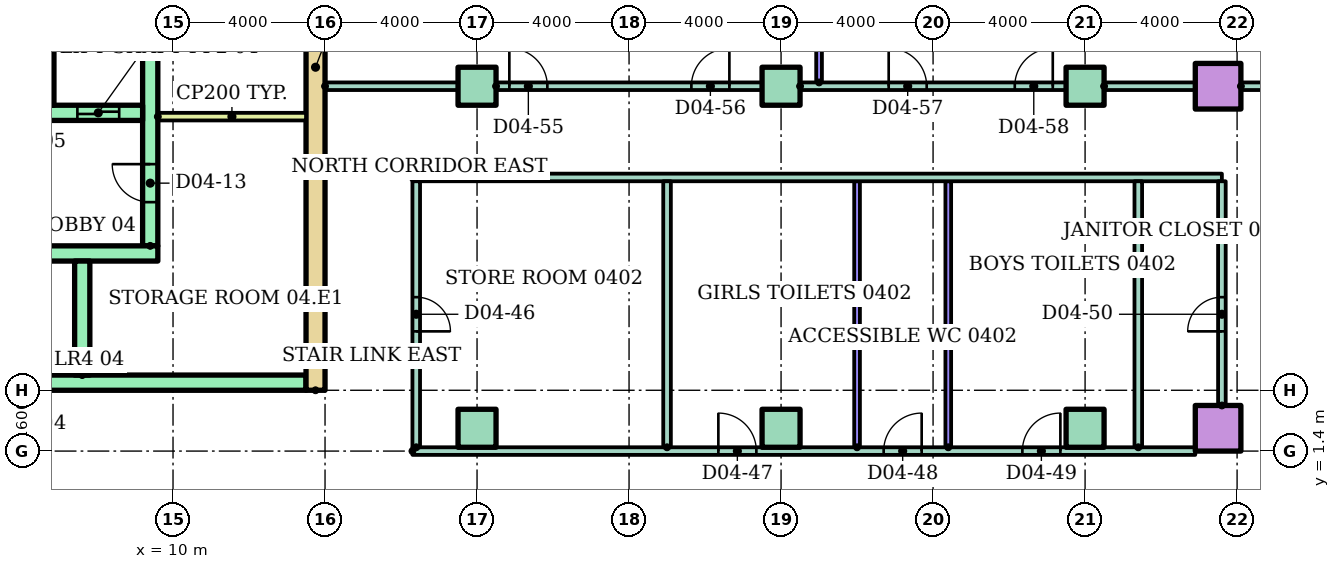
"""IFC4 building model, lengths in metres.
Left out: names, types, materials, properties, quantities, classifications, styles, units other than length and angle.
Written with IfcOpenShell. Run it as: python <this file> out.ifc"""

import sys

from ifc_helpers import new_model, si_unit, direction, frame, frame_2d, origin, origin_2d, place, context, subcontext, project, spatial, rectangle, hollow_rectangle, extrude, element, fill, save


model = new_model("IFC4")
c1 = context("Model", 3, precision=1e-05, world=origin(), true_north=direction((0.0, 1.0)))
c2 = subcontext(c1, "Body", "Model", "MODEL_VIEW")
j1 = project(units=[si_unit("LENGTHUNIT", "METRE"), si_unit("PLANEANGLEUNIT", "RADIAN")], contexts=[c1])
p1 = place(None, origin())
s1 = spatial("IfcSite", under=j1, at=p1, CompositionType="ELEMENT")
p2 = place(p1, origin())
s2 = spatial("IfcBuilding", under=s1, at=p2, CompositionType="ELEMENT")
p3 = place(p2, frame((0.0, 0.0, 18.0)))
s3 = spatial("IfcBuildingStorey", under=s2, at=p3, CompositionType="ELEMENT", Elevation=18.0)
for number, where in (
    (1, (18.0, 2.0, 0.0)),
    (2, (26.0, 2.0, 0.0)),
    (3, (34.0, 2.0, 0.0)),
):
    element("IfcColumn", number, at=place(p3, frame(where)), inside=s3, PredefinedType="COLUMN", context=c2, shape_type="SweptSolid", body=[
        extrude(rectangle(XDim=1.0, YDim=1.0, at=origin_2d()), origin(), (0.0, 0.0, 1.0), 4.0),
    ])
p4 = place(p3, frame((37.5, 2.0, 0.0)))
e4 = element("IfcColumn", 4, at=p4, inside=s3, PredefinedType="COLUMN", context=c2, shape_type="SweptSolid", body=[
    extrude(hollow_rectangle(XDim=1.2, YDim=1.2, WallThickness=0.06, at=origin_2d()), origin(), (0.0, 0.0, 1.0), 4.0),
])
for number, where in (
    (5, (18.0, 11.0, 0.0)),
    (6, (26.0, 11.0, 0.0)),
    (7, (34.0, 11.0, 0.0)),
):
    element("IfcColumn", number, at=place(p3, frame(where)), inside=s3, PredefinedType="COLUMN", context=c2, shape_type="SweptSolid", body=[
        extrude(rectangle(XDim=1.0, YDim=1.0, at=origin_2d()), origin(), (0.0, 0.0, 1.0), 4.0),
    ])
p5 = place(p3, frame((37.5, 11.0, 0.0)))
e8 = element("IfcColumn", 8, at=p5, inside=s3, PredefinedType="COLUMN", context=c2, shape_type="SweptSolid", body=[
    extrude(hollow_rectangle(XDim=1.2, YDim=1.2, WallThickness=0.06, at=origin_2d()), origin(), (0.0, 0.0, 1.0), 4.0),
])
p6 = place(p3, frame((13.75, 3.0, 0.0), z_axis=(0.0, 0.0, 1.0), x_axis=(0.0, 1.0, 0.0)))
e9 = element("IfcWall", 9, at=p6, inside=s3, PredefinedType="SHEAR", context=c2, shape_type="SweptSolid", body=[
    extrude(rectangle(XDim=17.0, YDim=0.5, at=frame_2d((8.5, 0.0))), origin(), (0.0, 0.0, 1.0), 3.7),
])
p7 = place(p3, frame((9.4, 6.8, 0.0), z_axis=(0.0, 0.0, 1.0), x_axis=(0.0, 1.0, 0.0)))
e10 = element("IfcWall", 10, at=p7, inside=s3, PredefinedType="SHEAR", context=c2, shape_type="SweptSolid", body=[
    extrude(rectangle(XDim=12.7, YDim=0.4, at=frame_2d((6.35, 0.0))), origin(), (0.0, 0.0, 1.0), 3.7),
])
p8 = place(p7, frame((1.15, 0.0, 0.0)))
e11 = element("IfcOpeningElement", 11, at=p8, cuts=e10, PredefinedType="OPENING", context=c2, shape_type="SweptSolid", body=[
    extrude(rectangle(XDim=1.0, YDim=2.1, at=frame_2d((0.5, 1.05))), frame((0.0, 0.21, 0.0), z_axis=(0.0, -1.0, 0.0), x_axis=(1.0, 0.0, 0.0)), (0.0, 0.0, 1.0), 0.42),
])
p9 = place(p7, frame((7.925, 0.0, 0.0)))
e12 = element("IfcOpeningElement", 12, at=p9, cuts=e10, PredefinedType="OPENING", context=c2, shape_type="SweptSolid", body=[
    extrude(rectangle(XDim=1.0, YDim=2.1, at=frame_2d((0.5, 1.05))), frame((0.0, 0.21, 0.0), z_axis=(0.0, -1.0, 0.0), x_axis=(1.0, 0.0, 0.0)), (0.0, 0.0, 1.0), 0.42),
])
p10 = place(p3, frame((-13.5, 3.2, 0.0)))
e13 = element("IfcWall", 13, at=p10, inside=s3, PredefinedType="SHEAR", context=c2, shape_type="SweptSolid", body=[
    extrude(rectangle(XDim=27.0, YDim=0.4, at=frame_2d((13.5, 0.0))), origin(), (0.0, 0.0, 1.0), 3.7),
])
p11 = place(p10, frame((6.861, 0.0, 0.0)))
e14 = element("IfcOpeningElement", 14, at=p11, cuts=e13, PredefinedType="OPENING", context=c2, shape_type="SweptSolid", body=[
    extrude(rectangle(XDim=1.1, YDim=2.1, at=frame_2d((0.55, 1.05))), frame((0.0, 0.21, 0.0), z_axis=(0.0, -1.0, 0.0), x_axis=(1.0, 0.0, 0.0)), (0.0, 0.0, 1.0), 0.42),
])
p12 = place(p10, frame((9.906, 0.0, 0.0)))
e15 = element("IfcOpeningElement", 15, at=p12, cuts=e13, PredefinedType="OPENING", context=c2, shape_type="SweptSolid", body=[
    extrude(rectangle(XDim=1.1, YDim=2.1, at=frame_2d((0.55, 1.05))), frame((0.0, 0.21, 0.0), z_axis=(0.0, -1.0, 0.0), x_axis=(1.0, 0.0, 0.0)), (0.0, 0.0, 1.0), 0.42),
])
p13 = place(p10, frame((15.994, 0.0, 0.0)))
e16 = element("IfcOpeningElement", 16, at=p13, cuts=e13, PredefinedType="OPENING", context=c2, shape_type="SweptSolid", body=[
    extrude(rectangle(XDim=1.1, YDim=2.1, at=frame_2d((0.55, 1.05))), frame((0.0, 0.21, 0.0), z_axis=(0.0, -1.0, 0.0), x_axis=(1.0, 0.0, 0.0)), (0.0, 0.0, 1.0), 0.42),
])
p14 = place(p10, frame((19.039, 0.0, 0.0)))
e17 = element("IfcOpeningElement", 17, at=p14, cuts=e13, PredefinedType="OPENING", context=c2, shape_type="SweptSolid", body=[
    extrude(rectangle(XDim=1.1, YDim=2.1, at=frame_2d((0.55, 1.05))), frame((0.0, 0.21, 0.0), z_axis=(0.0, -1.0, 0.0), x_axis=(1.0, 0.0, 0.0)), (0.0, 0.0, 1.0), 0.42),
])
p15 = place(p10, frame((12.6, 0.0, 0.0)))
e18 = element("IfcOpeningElement", 18, at=p15, cuts=e13, PredefinedType="OPENING", context=c2, shape_type="SweptSolid", body=[
    extrude(rectangle(XDim=1.8, YDim=2.1, at=frame_2d((0.9, 1.05))), frame((0.0, 0.21, 0.0), z_axis=(0.0, -1.0, 0.0), x_axis=(1.0, 0.0, 0.0)), (0.0, 0.0, 1.0), 0.42),
])
p16 = place(p3, frame((1.522, 6.6, 0.0)))
e19 = element("IfcWall", 19, at=p16, inside=s3, PredefinedType="SHEAR", context=c2, shape_type="SweptSolid", body=[
    extrude(rectangle(XDim=8.078, YDim=0.4, at=frame_2d((4.039, 0.0))), origin(), (0.0, 0.0, 1.0), 3.7),
])
p17 = place(p3, frame((7.611, 3.4, 0.0), z_axis=(0.0, 0.0, 1.0), x_axis=(0.0, 1.0, 0.0)))
e20 = element("IfcWall", 20, at=p17, inside=s3, PredefinedType="SHEAR", context=c2, shape_type="SweptSolid", body=[
    extrude(rectangle(XDim=3.0, YDim=0.4, at=frame_2d((1.5, 0.0))), origin(), (0.0, 0.0, 1.0), 3.7),
])
p18 = place(p3, frame((1.2, 10.3, 0.0)))
e21 = element("IfcWall", 21, at=p18, inside=s3, PredefinedType="SHEAR", context=c2, shape_type="SweptSolid", body=[
    extrude(rectangle(XDim=8.0, YDim=0.4, at=frame_2d((4.0, 0.0))), origin(), (0.0, 0.0, 1.0), 3.7),
])
p19 = place(p18, frame((3.55, 0.0, 0.0)))
e22 = element("IfcOpeningElement", 22, at=p19, cuts=e21, PredefinedType="OPENING", context=c2, shape_type="SweptSolid", body=[
    extrude(rectangle(XDim=1.1, YDim=2.1, at=frame_2d((0.55, 1.05))), frame((0.0, 0.21, 0.0), z_axis=(0.0, -1.0, 0.0), x_axis=(1.0, 0.0, 0.0)), (0.0, 0.0, 1.0), 0.42),
])
p20 = place(p18, frame((6.283, 0.0, 0.0)))
e23 = element("IfcOpeningElement", 23, at=p20, cuts=e21, PredefinedType="OPENING", context=c2, shape_type="SweptSolid", body=[
    extrude(rectangle(XDim=1.1, YDim=2.1, at=frame_2d((0.55, 1.05))), frame((0.0, 0.21, 0.0), z_axis=(0.0, -1.0, 0.0), x_axis=(1.0, 0.0, 0.0)), (0.0, 0.0, 1.0), 0.42),
])
p21 = place(p18, frame((0.867, 0.0, 0.0)))
e24 = element("IfcOpeningElement", 24, at=p21, cuts=e21, PredefinedType="OPENING", context=c2, shape_type="SweptSolid", body=[
    extrude(rectangle(XDim=1.0, YDim=2.1, at=frame_2d((0.5, 1.05))), frame((0.0, 0.21, 0.0), z_axis=(0.0, -1.0, 0.0), x_axis=(1.0, 0.0, 0.0)), (0.0, 0.0, 1.0), 0.42),
])
p22 = place(p3, frame((6.667, 10.5, 0.0), z_axis=(0.0, 0.0, 1.0), x_axis=(0.0, 1.0, 0.0)))
e25 = element("IfcWall", 25, at=p22, inside=s3, PredefinedType="SHEAR", context=c2, shape_type="SweptSolid", body=[
    extrude(rectangle(XDim=3.0, YDim=0.4, at=frame_2d((1.5, 0.0))), origin(), (0.0, 0.0, 1.0), 3.7),
])
p23 = place(p3, frame((9.6, 10.2, 0.0)))
e26 = element("IfcWall", 26, at=p23, inside=s3, PredefinedType="PARTITIONING", context=c2, shape_type="SweptSolid", body=[
    extrude(rectangle(XDim=3.9, YDim=0.2, at=frame_2d((1.95, 0.0))), origin(), (0.0, 0.0, 1.0), 3.7),
])
p24 = place(p3, frame((16.3, 1.4, 0.0)))
e27 = element("IfcWall", 27, at=p24, inside=s3, PredefinedType="PARTITIONING", context=c2, shape_type="SweptSolid", body=[
    extrude(rectangle(XDim=20.6, YDim=0.2, at=frame_2d((10.3, 0.0))), origin(), (0.0, 0.0, 1.0), 3.7),
])
p25 = place(p24, frame((8.05, 0.0, 0.0)))
e28 = element("IfcOpeningElement", 28, at=p25, cuts=e27, PredefinedType="OPENING", context=c2, shape_type="SweptSolid", body=[
    extrude(rectangle(XDim=1.0, YDim=2.1, at=frame_2d((0.5, 1.05))), frame((0.0, 0.11, 0.0), z_axis=(0.0, -1.0, 0.0), x_axis=(1.0, 0.0, 0.0)), (0.0, 0.0, 1.0), 0.22),
])
p26 = place(p24, frame((12.4, 0.0, 0.0)))
e29 = element("IfcOpeningElement", 29, at=p26, cuts=e27, PredefinedType="OPENING", context=c2, shape_type="SweptSolid", body=[
    extrude(rectangle(XDim=1.0, YDim=2.1, at=frame_2d((0.5, 1.05))), frame((0.0, 0.11, 0.0), z_axis=(0.0, -1.0, 0.0), x_axis=(1.0, 0.0, 0.0)), (0.0, 0.0, 1.0), 0.22),
])
p27 = place(p24, frame((16.05, 0.0, 0.0)))
e30 = element("IfcOpeningElement", 30, at=p27, cuts=e27, PredefinedType="OPENING", context=c2, shape_type="SweptSolid", body=[
    extrude(rectangle(XDim=1.0, YDim=2.1, at=frame_2d((0.5, 1.05))), frame((0.0, 0.11, 0.0), z_axis=(0.0, -1.0, 0.0), x_axis=(1.0, 0.0, 0.0)), (0.0, 0.0, 1.0), 0.22),
])
p28 = place(p3, frame((16.3, 8.6, 0.0)))
e31 = element("IfcWall", 31, at=p28, inside=s3, PredefinedType="PARTITIONING", context=c2, shape_type="SweptSolid", body=[
    extrude(rectangle(XDim=21.3, YDim=0.2, at=frame_2d((10.65, 0.0))), origin(), (0.0, 0.0, 1.0), 3.7),
])
p29 = place(p3, frame((14.0, 11.0, 0.0)))
e32 = element("IfcWall", 32, at=p29, inside=s3, PredefinedType="PARTITIONING", context=c2, shape_type="SweptSolid", body=[
    extrude(rectangle(XDim=3.5, YDim=0.2, at=frame_2d((1.75, 0.0))), origin(), (0.0, 0.0, 1.0), 3.7),
])
p30 = place(p3, frame((18.5, 11.0, 0.0)))
e33 = element("IfcWall", 33, at=p30, inside=s3, PredefinedType="PARTITIONING", context=c2, shape_type="SweptSolid", body=[
    extrude(rectangle(XDim=7.0, YDim=0.2, at=frame_2d((3.5, 0.0))), origin(), (0.0, 0.0, 1.0), 3.7),
])
p31 = place(p30, frame((0.35, 0.0, 0.0)))
e34 = element("IfcOpeningElement", 34, at=p31, cuts=e33, PredefinedType="OPENING", context=c2, shape_type="SweptSolid", body=[
    extrude(rectangle(XDim=1.0, YDim=2.1, at=frame_2d((0.5, 1.05))), frame((0.0, 0.11, 0.0), z_axis=(0.0, -1.0, 0.0), x_axis=(1.0, 0.0, 0.0)), (0.0, 0.0, 1.0), 0.22),
])
p32 = place(p30, frame((5.14, 0.0, 0.0)))
e35 = element("IfcOpeningElement", 35, at=p32, cuts=e33, PredefinedType="OPENING", context=c2, shape_type="SweptSolid", body=[
    extrude(rectangle(XDim=1.0, YDim=2.1, at=frame_2d((0.5, 1.05))), frame((0.0, 0.11, 0.0), z_axis=(0.0, -1.0, 0.0), x_axis=(1.0, 0.0, 0.0)), (0.0, 0.0, 1.0), 0.22),
])
p33 = place(p3, frame((26.5, 11.0, 0.0)))
e36 = element("IfcWall", 36, at=p33, inside=s3, PredefinedType="PARTITIONING", context=c2, shape_type="SweptSolid", body=[
    extrude(rectangle(XDim=7.0, YDim=0.2, at=frame_2d((3.5, 0.0))), origin(), (0.0, 0.0, 1.0), 3.7),
])
p34 = place(p33, frame((2.332, 0.0, 0.0)))
e37 = element("IfcOpeningElement", 37, at=p34, cuts=e36, PredefinedType="OPENING", context=c2, shape_type="SweptSolid", body=[
    extrude(rectangle(XDim=1.0, YDim=2.1, at=frame_2d((0.5, 1.05))), frame((0.0, 0.11, 0.0), z_axis=(0.0, -1.0, 0.0), x_axis=(1.0, 0.0, 0.0)), (0.0, 0.0, 1.0), 0.22),
])
p35 = place(p33, frame((5.65, 0.0, 0.0)))
e38 = element("IfcOpeningElement", 38, at=p35, cuts=e36, PredefinedType="OPENING", context=c2, shape_type="SweptSolid", body=[
    extrude(rectangle(XDim=1.0, YDim=2.1, at=frame_2d((0.5, 1.05))), frame((0.0, 0.11, 0.0), z_axis=(0.0, -1.0, 0.0), x_axis=(1.0, 0.0, 0.0)), (0.0, 0.0, 1.0), 0.22),
])
p36 = place(p3, frame((34.5, 11.0, 0.0)))
e39 = element("IfcWall", 39, at=p36, inside=s3, PredefinedType="PARTITIONING", context=c2, shape_type="SweptSolid", body=[
    extrude(rectangle(XDim=2.4, YDim=0.2, at=frame_2d((1.2, 0.0))), origin(), (0.0, 0.0, 1.0), 3.7),
])
p37 = place(p3, frame((38.1, 11.0, 0.0)))
e40 = element("IfcWall", 40, at=p37, inside=s3, PredefinedType="PARTITIONING", context=c2, shape_type="SweptSolid", body=[
    extrude(rectangle(XDim=1.5, YDim=0.2, at=frame_2d((0.75, 0.0))), origin(), (0.0, 0.0, 1.0), 3.7),
])
p38 = place(p3, frame((16.4, 1.5, 0.0), z_axis=(0.0, 0.0, 1.0), x_axis=(0.0, 1.0, 0.0)))
e41 = element("IfcWall", 41, at=p38, inside=s3, PredefinedType="PARTITIONING", context=c2, shape_type="SweptSolid", body=[
    extrude(rectangle(XDim=7.0, YDim=0.2, at=frame_2d((3.5, 0.0))), origin(), (0.0, 0.0, 1.0), 3.7),
])
p39 = place(p38, frame((3.05, 0.0, 0.0)))
e42 = element("IfcOpeningElement", 42, at=p39, cuts=e41, PredefinedType="OPENING", context=c2, shape_type="SweptSolid", body=[
    extrude(rectangle(XDim=0.9, YDim=2.1, at=frame_2d((0.45, 1.05))), frame((0.0, 0.11, 0.0), z_axis=(0.0, -1.0, 0.0), x_axis=(1.0, 0.0, 0.0)), (0.0, 0.0, 1.0), 0.22),
])
p40 = place(p3, frame((23.0, 1.5, 0.0), z_axis=(0.0, 0.0, 1.0), x_axis=(0.0, 1.0, 0.0)))
e43 = element("IfcWall", 43, at=p40, inside=s3, PredefinedType="PARTITIONING", context=c2, shape_type="SweptSolid", body=[
    extrude(rectangle(XDim=7.0, YDim=0.2, at=frame_2d((3.5, 0.0))), origin(), (0.0, 0.0, 1.0), 3.7),
])
p41 = place(p3, frame((27.0, 11.1, 0.0), z_axis=(0.0, 0.0, 1.0), x_axis=(0.0, 1.0, 0.0)))
e44 = element("IfcWall", 44, at=p41, inside=s3, PredefinedType="PARTITIONING", context=c2, shape_type="SweptSolid", body=[
    extrude(rectangle(XDim=8.5, YDim=0.15, at=frame_2d((4.25, 0.0))), origin(), (0.0, 0.0, 1.0), 3.7),
])
for number, where, z_axis, x_axis in (
    (45, (28.0, 1.5, 0.0), (0.0, 0.0, 1.0), (0.0, 1.0, 0.0)),
    (46, (30.4, 1.5, 0.0), (0.0, 0.0, 1.0), (0.0, 1.0, 0.0)),
):
    element("IfcWall", number, at=place(p3, frame(where, z_axis=z_axis, x_axis=x_axis)), inside=s3, PredefinedType="PARTITIONING", context=c2, shape_type="SweptSolid", body=[
        extrude(rectangle(XDim=7.0, YDim=0.15, at=frame_2d((3.5, 0.0))), origin(), (0.0, 0.0, 1.0), 3.7),
    ])
p42 = place(p3, frame((35.4, 1.5, 0.0), z_axis=(0.0, 0.0, 1.0), x_axis=(0.0, 1.0, 0.0)))
e47 = element("IfcWall", 47, at=p42, inside=s3, PredefinedType="PARTITIONING", context=c2, shape_type="SweptSolid", body=[
    extrude(rectangle(XDim=7.0, YDim=0.2, at=frame_2d((3.5, 0.0))), origin(), (0.0, 0.0, 1.0), 3.7),
])
p43 = place(p3, frame((37.6, 2.6, 0.0), z_axis=(0.0, 0.0, 1.0), x_axis=(0.0, 1.0, 0.0)))
e48 = element("IfcWall", 48, at=p43, inside=s3, PredefinedType="PARTITIONING", context=c2, shape_type="SweptSolid", body=[
    extrude(rectangle(XDim=5.9, YDim=0.2, at=frame_2d((2.95, 0.0))), origin(), (0.0, 0.0, 1.0), 3.7),
])
p44 = place(p43, frame((1.95, 0.0, 0.0)))
e49 = element("IfcOpeningElement", 49, at=p44, cuts=e48, PredefinedType="OPENING", context=c2, shape_type="SweptSolid", body=[
    extrude(rectangle(XDim=0.9, YDim=2.1, at=frame_2d((0.45, 1.05))), frame((0.0, 0.11, 0.0), z_axis=(0.0, -1.0, 0.0), x_axis=(1.0, 0.0, 0.0)), (0.0, 0.0, 1.0), 0.22),
])
p45 = place(p20, origin())
e50 = element("IfcDoor", 50, at=p45, inside=s3, OperationType="SLIDING_TO_LEFT", PredefinedType="DOOR", context=c2, shape_type="SweptSolid", body=[
    extrude(rectangle(XDim=1.1, YDim=2.1, at=frame_2d((0.55, 1.05))), frame((0.0, 0.025, 0.0), z_axis=(0.0, -1.0, 0.0), x_axis=(1.0, 0.0, 0.0)), (0.0, 0.0, 1.0), 0.05),
])
fill(e23, e50)
p46 = place(p8, origin())
e51 = element("IfcDoor", 51, at=p46, inside=s3, OperationType="SINGLE_SWING_RIGHT", PredefinedType="DOOR", context=c2, shape_type="SweptSolid", body=[
    extrude(rectangle(XDim=1.0, YDim=2.1, at=frame_2d((0.5, 1.05))), frame((0.0, 0.025, 0.0), z_axis=(0.0, -1.0, 0.0), x_axis=(1.0, 0.0, 0.0)), (0.0, 0.0, 1.0), 0.05),
])
fill(e11, e51)
p47 = place(p39, frame((0.9, 0.0, 0.0), z_axis=(0.0, 0.0, 1.0), x_axis=(-1.0, 0.0, 0.0)))
e52 = element("IfcDoor", 52, at=p47, inside=s3, OperationType="SINGLE_SWING_LEFT", PredefinedType="DOOR", context=c2, shape_type="SweptSolid", body=[
    extrude(rectangle(XDim=0.9, YDim=2.1, at=frame_2d((0.45, 1.05))), frame((0.0, 0.025, 0.0), z_axis=(0.0, -1.0, 0.0), x_axis=(1.0, 0.0, 0.0)), (0.0, 0.0, 1.0), 0.05),
])
fill(e42, e52)
p48 = place(p25, origin())
e53 = element("IfcDoor", 53, at=p48, inside=s3, OperationType="SINGLE_SWING_LEFT", PredefinedType="DOOR", context=c2, shape_type="SweptSolid", body=[
    extrude(rectangle(XDim=1.0, YDim=2.1, at=frame_2d((0.5, 1.05))), frame((0.0, 0.025, 0.0), z_axis=(0.0, -1.0, 0.0), x_axis=(1.0, 0.0, 0.0)), (0.0, 0.0, 1.0), 0.05),
])
fill(e28, e53)
p49 = place(p26, origin())
e54 = element("IfcDoor", 54, at=p49, inside=s3, OperationType="SINGLE_SWING_RIGHT", PredefinedType="DOOR", context=c2, shape_type="SweptSolid", body=[
    extrude(rectangle(XDim=1.0, YDim=2.1, at=frame_2d((0.5, 1.05))), frame((0.0, 0.025, 0.0), z_axis=(0.0, -1.0, 0.0), x_axis=(1.0, 0.0, 0.0)), (0.0, 0.0, 1.0), 0.05),
])
fill(e29, e54)
p50 = place(p27, origin())
e55 = element("IfcDoor", 55, at=p50, inside=s3, OperationType="SINGLE_SWING_RIGHT", PredefinedType="DOOR", context=c2, shape_type="SweptSolid", body=[
    extrude(rectangle(XDim=1.0, YDim=2.1, at=frame_2d((0.5, 1.05))), frame((0.0, 0.025, 0.0), z_axis=(0.0, -1.0, 0.0), x_axis=(1.0, 0.0, 0.0)), (0.0, 0.0, 1.0), 0.05),
])
fill(e30, e55)
p51 = place(p44, origin())
e56 = element("IfcDoor", 56, at=p51, inside=s3, OperationType="SINGLE_SWING_LEFT", PredefinedType="DOOR", context=c2, shape_type="SweptSolid", body=[
    extrude(rectangle(XDim=0.9, YDim=2.1, at=frame_2d((0.45, 1.05))), frame((0.0, 0.025, 0.0), z_axis=(0.0, -1.0, 0.0), x_axis=(1.0, 0.0, 0.0)), (0.0, 0.0, 1.0), 0.05),
])
fill(e49, e56)
p52 = place(p31, origin())
e57 = element("IfcDoor", 57, at=p52, inside=s3, OperationType="SINGLE_SWING_LEFT", PredefinedType="DOOR", context=c2, shape_type="SweptSolid", body=[
    extrude(rectangle(XDim=1.0, YDim=2.1, at=frame_2d((0.5, 1.05))), frame((0.0, 0.025, 0.0), z_axis=(0.0, -1.0, 0.0), x_axis=(1.0, 0.0, 0.0)), (0.0, 0.0, 1.0), 0.05),
])
fill(e34, e57)
p53 = place(p32, origin())
e58 = element("IfcDoor", 58, at=p53, inside=s3, OperationType="SINGLE_SWING_RIGHT", PredefinedType="DOOR", context=c2, shape_type="SweptSolid", body=[
    extrude(rectangle(XDim=1.0, YDim=2.1, at=frame_2d((0.5, 1.05))), frame((0.0, 0.025, 0.0), z_axis=(0.0, -1.0, 0.0), x_axis=(1.0, 0.0, 0.0)), (0.0, 0.0, 1.0), 0.05),
])
fill(e35, e58)
p54 = place(p34, origin())
e59 = element("IfcDoor", 59, at=p54, inside=s3, OperationType="SINGLE_SWING_LEFT", PredefinedType="DOOR", context=c2, shape_type="SweptSolid", body=[
    extrude(rectangle(XDim=1.0, YDim=2.1, at=frame_2d((0.5, 1.05))), frame((0.0, 0.025, 0.0), z_axis=(0.0, -1.0, 0.0), x_axis=(1.0, 0.0, 0.0)), (0.0, 0.0, 1.0), 0.05),
])
fill(e37, e59)
p55 = place(p35, origin())
e60 = element("IfcDoor", 60, at=p55, inside=s3, OperationType="SINGLE_SWING_RIGHT", PredefinedType="DOOR", context=c2, shape_type="SweptSolid", body=[
    extrude(rectangle(XDim=1.0, YDim=2.1, at=frame_2d((0.5, 1.05))), frame((0.0, 0.025, 0.0), z_axis=(0.0, -1.0, 0.0), x_axis=(1.0, 0.0, 0.0)), (0.0, 0.0, 1.0), 0.05),
])
fill(e38, e60)
save(model, sys.argv[1])
